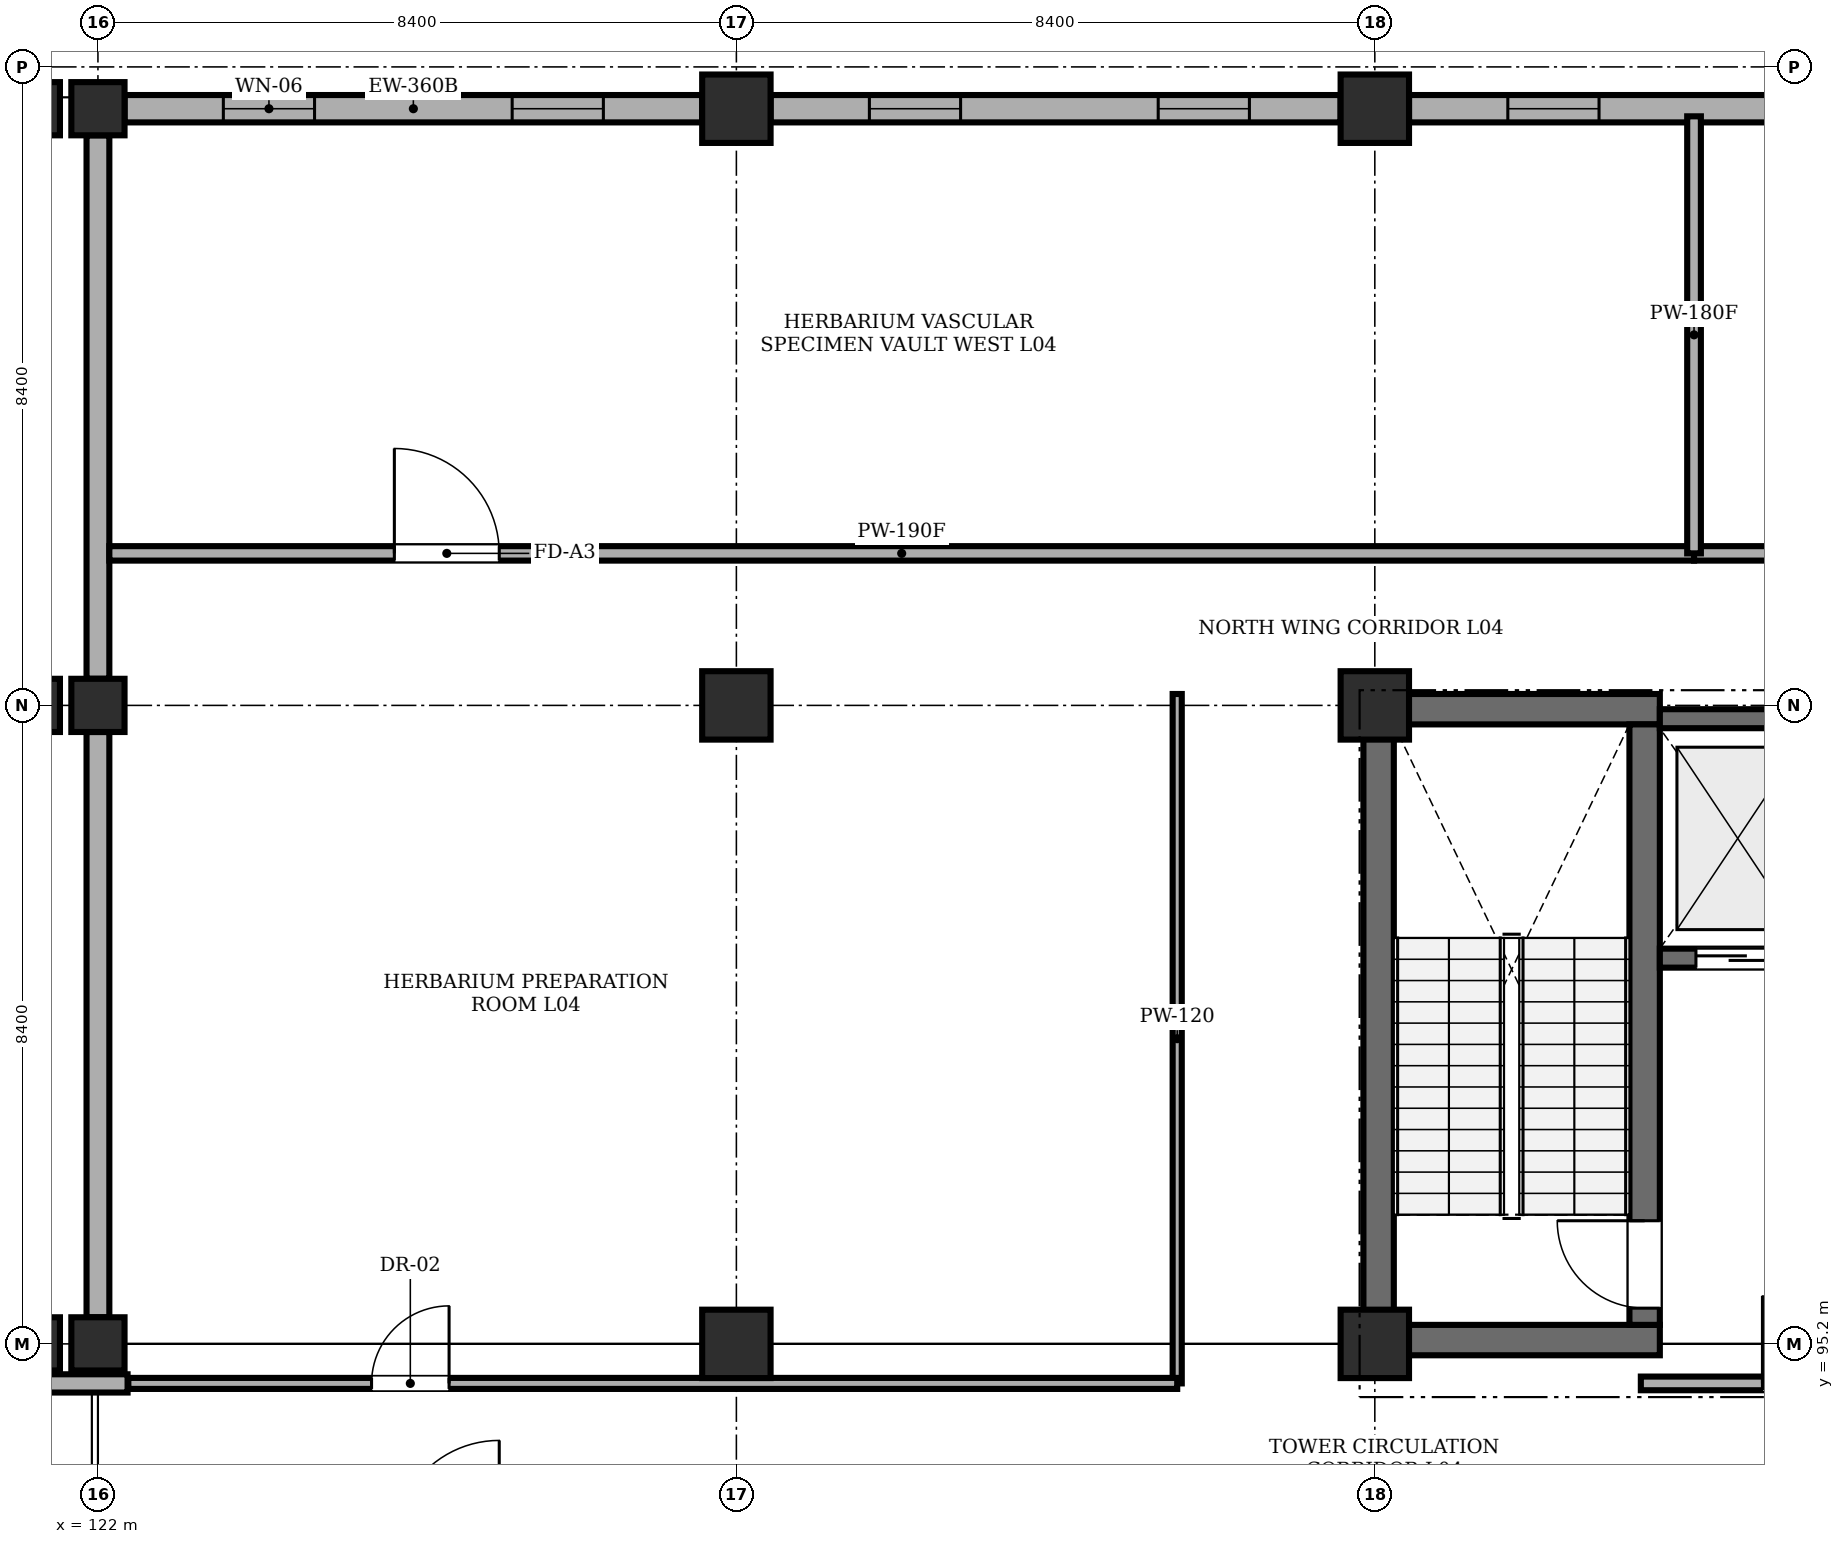
"""IFC4 building model, lengths in metres.
Left out: names, types, materials, properties, quantities, classifications, styles, units other than length and angle.
Written with IfcOpenShell. Run it as: python <this file> out.ifc"""

import sys

from ifc_helpers import new_model, si_unit, direction, frame, frame_2d, origin, origin_2d, place, context, subcontext, project, spatial, rectangle, extrude, element, fill, save


model = new_model("IFC4")
c1 = context("Model", 3, precision=1e-05, world=origin(), true_north=direction((0.0, 1.0)))
c2 = subcontext(c1, "Body", "Model", "MODEL_VIEW")
j1 = project(units=[si_unit("LENGTHUNIT", "METRE"), si_unit("PLANEANGLEUNIT", "RADIAN")], contexts=[c1])
p1 = place(None, origin())
s1 = spatial("IfcSite", under=j1, at=p1, CompositionType="ELEMENT")
p2 = place(p1, origin())
s2 = spatial("IfcBuilding", under=s1, at=p2, CompositionType="ELEMENT")
p3 = place(p2, frame((0.0, 0.0, 14.7)))
s3 = spatial("IfcBuildingStorey", under=s2, at=p3, CompositionType="ELEMENT", Elevation=14.7)
for number, where, z_axis, x_axis in (
    (1, (121.15, 95.2, 0.0), (0.0, 0.0, 1.0), (1.0, 0.0, 0.0)),
    (2, (121.15, 103.6, 0.0), (0.0, 0.0, 1.0), (1.0, 0.0, 0.0)),
    (3, (121.15, 111.45, 0.0), (0.0, 0.0, 1.0), (1.0, 0.0, 0.0)),
):
    element("IfcColumn", number, at=place(p3, frame(where, z_axis=z_axis, x_axis=x_axis)), inside=s3, PredefinedType="COLUMN", context=c2, shape_type="SweptSolid", body=[
        extrude(rectangle(XDim=0.7, YDim=0.7, at=origin_2d()), origin(), (0.0, 0.0, 1.0), 4.5),
    ])
for number, where, z_axis, x_axis in (
    (4, (122.0, 95.2, 0.0), (0.0, 0.0, 1.0), (1.0, 0.0, 0.0)),
    (5, (122.0, 103.6, 0.0), (0.0, 0.0, 1.0), (1.0, 0.0, 0.0)),
    (6, (122.0, 111.45, 0.0), (0.0, 0.0, 1.0), (1.0, 0.0, 0.0)),
):
    element("IfcColumn", number, at=place(p3, frame(where, z_axis=z_axis, x_axis=x_axis)), inside=s3, PredefinedType="COLUMN", context=c2, shape_type="SweptSolid", body=[
        extrude(rectangle(XDim=0.7, YDim=0.7, at=origin_2d()), origin(), (0.0, 0.0, 1.0), 4.26),
    ])
for number, where, z_axis, x_axis in (
    (7, (130.4, 95.2, 0.0), (0.0, 0.0, 1.0), (1.0, 0.0, 0.0)),
    (8, (130.4, 103.6, 0.0), (0.0, 0.0, 1.0), (1.0, 0.0, 0.0)),
    (9, (130.4, 111.45, 0.0), (0.0, 0.0, 1.0), (1.0, 0.0, 0.0)),
    (10, (138.8, 95.2, 0.0), (0.0, 0.0, 1.0), (1.0, 0.0, 0.0)),
    (11, (138.8, 103.6, 0.0), (0.0, 0.0, 1.0), (1.0, 0.0, 0.0)),
    (12, (138.8, 111.45, 0.0), (0.0, 0.0, 1.0), (1.0, 0.0, 0.0)),
):
    element("IfcColumn", number, at=place(p3, frame(where, z_axis=z_axis, x_axis=x_axis)), inside=s3, PredefinedType="COLUMN", context=c2, shape_type="SweptSolid", body=[
        extrude(rectangle(XDim=0.9, YDim=0.9, at=origin_2d()), origin(), (0.0, 0.0, 1.0), 4.26),
    ])
for number, where, z_axis, x_axis in (
    (13, (138.65, 95.25, 0.0), (0.0, 0.0, 1.0), (1.0, 0.0, 0.0)),
    (14, (138.65, 103.55, 0.0), (0.0, 0.0, 1.0), (1.0, 0.0, 0.0)),
):
    element("IfcWall", number, at=place(p3, frame(where, z_axis=z_axis, x_axis=x_axis)), inside=s3, PredefinedType="SHEAR", context=c2, shape_type="SweptSolid", body=[
        extrude(rectangle(XDim=3.9, YDim=0.4, at=frame_2d((1.95, 0.0))), origin(), (0.0, 0.0, 1.0), 4.26),
    ])
p4 = place(p3, frame((138.85, 95.45, 0.0), z_axis=(0.0, 0.0, 1.0), x_axis=(0.0, 1.0, 0.0)))
e15 = element("IfcWall", 15, at=p4, inside=s3, PredefinedType="SHEAR", context=c2, shape_type="SweptSolid", body=[
    extrude(rectangle(XDim=7.9, YDim=0.4, at=frame_2d((3.95, 0.0))), origin(), (0.0, 0.0, 1.0), 4.26),
])
p5 = place(p3, frame((142.35, 95.45, 0.0), z_axis=(0.0, 0.0, 1.0), x_axis=(0.0, 1.0, 0.0)))
e16 = element("IfcWall", 16, at=p5, inside=s3, PredefinedType="SHEAR", context=c2, shape_type="SweptSolid", body=[
    extrude(rectangle(XDim=7.9, YDim=0.4, at=frame_2d((3.95, 0.0))), origin(), (0.0, 0.0, 1.0), 4.26),
])
p6 = place(p5, frame((0.22, 0.0, 0.0)))
e17 = element("IfcOpeningElement", 17, at=p6, cuts=e16, PredefinedType="OPENING", context=c2, shape_type="SweptSolid", body=[
    extrude(rectangle(XDim=1.15, YDim=2.15, at=frame_2d((0.575, 1.075))), frame((0.0, 0.21, 0.0), z_axis=(0.0, -1.0, 0.0), x_axis=(1.0, 0.0, 0.0)), (0.0, 0.0, 1.0), 0.42),
])
p7 = place(p3, frame((142.55, 100.275, 0.0), z_axis=(0.0, 0.0, 1.0), x_axis=(1.0, 0.0, 0.0)))
e18 = element("IfcWall", 18, at=p7, inside=s3, PredefinedType="SHEAR", context=c2, shape_type="SweptSolid", body=[
    extrude(rectangle(XDim=2.05, YDim=0.25, at=frame_2d((1.025, 0.0))), origin(), (0.0, 0.0, 1.0), 4.26),
])
p8 = place(p7, frame((0.475, 0.0, 0.0)))
e19 = element("IfcOpeningElement", 19, at=p8, cuts=e18, PredefinedType="OPENING", context=c2, shape_type="SweptSolid", body=[
    extrude(rectangle(XDim=1.1, YDim=2.15, at=frame_2d((0.55, 1.075))), frame((0.0, 0.135, 0.0), z_axis=(0.0, -1.0, 0.0), x_axis=(1.0, 0.0, 0.0)), (0.0, 0.0, 1.0), 0.27),
])
p9 = place(p3, frame((142.55, 103.425, 0.0), z_axis=(0.0, 0.0, 1.0), x_axis=(1.0, 0.0, 0.0)))
e20 = element("IfcWall", 20, at=p9, inside=s3, PredefinedType="SHEAR", context=c2, shape_type="SweptSolid", body=[
    extrude(rectangle(XDim=2.05, YDim=0.25, at=frame_2d((1.025, 0.0))), origin(), (0.0, 0.0, 1.0), 4.26),
])
p10 = place(p3, frame((122.35, 111.45, 0.0), z_axis=(0.0, 0.0, 1.0), x_axis=(1.0, 0.0, 0.0)))
e21 = element("IfcWall", 21, at=p10, inside=s3, PredefinedType="STANDARD", context=c2, shape_type="SweptSolid", body=[
    extrude(rectangle(XDim=7.6, YDim=0.36, at=frame_2d((3.8, 0.0))), origin(), (0.0, 0.0, 1.0), 3.56),
])
p11 = place(p10, frame((1.3, 0.0, 1.1)))
e22 = element("IfcOpeningElement", 22, at=p11, cuts=e21, PredefinedType="OPENING", context=c2, shape_type="SweptSolid", body=[
    extrude(rectangle(XDim=1.2, YDim=1.8, at=frame_2d((0.6, 0.9))), frame((0.0, 0.19, 0.0), z_axis=(0.0, -1.0, 0.0), x_axis=(1.0, 0.0, 0.0)), (0.0, 0.0, 1.0), 0.38),
])
p12 = place(p10, frame((5.1, 0.0, 1.1)))
e23 = element("IfcOpeningElement", 23, at=p12, cuts=e21, PredefinedType="OPENING", context=c2, shape_type="SweptSolid", body=[
    extrude(rectangle(XDim=1.2, YDim=1.8, at=frame_2d((0.6, 0.9))), frame((0.0, 0.19, 0.0), z_axis=(0.0, -1.0, 0.0), x_axis=(1.0, 0.0, 0.0)), (0.0, 0.0, 1.0), 0.38),
])
p13 = place(p3, frame((130.85, 111.45, 0.0), z_axis=(0.0, 0.0, 1.0), x_axis=(1.0, 0.0, 0.0)))
e24 = element("IfcWall", 24, at=p13, inside=s3, PredefinedType="STANDARD", context=c2, shape_type="SweptSolid", body=[
    extrude(rectangle(XDim=7.5, YDim=0.36, at=frame_2d((3.75, 0.0))), origin(), (0.0, 0.0, 1.0), 3.56),
])
p14 = place(p13, frame((1.3, 0.0, 1.1)))
e25 = element("IfcOpeningElement", 25, at=p14, cuts=e24, PredefinedType="OPENING", context=c2, shape_type="SweptSolid", body=[
    extrude(rectangle(XDim=1.2, YDim=1.8, at=frame_2d((0.6, 0.9))), frame((0.0, 0.19, 0.0), z_axis=(0.0, -1.0, 0.0), x_axis=(1.0, 0.0, 0.0)), (0.0, 0.0, 1.0), 0.38),
])
p15 = place(p13, frame((5.1, 0.0, 1.1)))
e26 = element("IfcOpeningElement", 26, at=p15, cuts=e24, PredefinedType="OPENING", context=c2, shape_type="SweptSolid", body=[
    extrude(rectangle(XDim=1.2, YDim=1.8, at=frame_2d((0.6, 0.9))), frame((0.0, 0.19, 0.0), z_axis=(0.0, -1.0, 0.0), x_axis=(1.0, 0.0, 0.0)), (0.0, 0.0, 1.0), 0.38),
])
p16 = place(p3, frame((139.25, 111.45, 0.0), z_axis=(0.0, 0.0, 1.0), x_axis=(1.0, 0.0, 0.0)))
e27 = element("IfcWall", 27, at=p16, inside=s3, PredefinedType="STANDARD", context=c2, shape_type="SweptSolid", body=[
    extrude(rectangle(XDim=7.5, YDim=0.36, at=frame_2d((3.75, 0.0))), origin(), (0.0, 0.0, 1.0), 3.56),
])
p17 = place(p16, frame((1.3, 0.0, 1.1)))
e28 = element("IfcOpeningElement", 28, at=p17, cuts=e27, PredefinedType="OPENING", context=c2, shape_type="SweptSolid", body=[
    extrude(rectangle(XDim=1.2, YDim=1.8, at=frame_2d((0.6, 0.9))), frame((0.0, 0.19, 0.0), z_axis=(0.0, -1.0, 0.0), x_axis=(1.0, 0.0, 0.0)), (0.0, 0.0, 1.0), 0.38),
])
p18 = place(p16, frame((5.1, 0.0, 1.1)))
e29 = element("IfcOpeningElement", 29, at=p18, cuts=e27, PredefinedType="OPENING", context=c2, shape_type="SweptSolid", body=[
    extrude(rectangle(XDim=1.2, YDim=1.8, at=frame_2d((0.6, 0.9))), frame((0.0, 0.19, 0.0), z_axis=(0.0, -1.0, 0.0), x_axis=(1.0, 0.0, 0.0)), (0.0, 0.0, 1.0), 0.38),
])
p19 = place(p3, frame((121.03, 94.68, 0.0), z_axis=(0.0, 0.0, 1.0), x_axis=(1.0, 0.0, 0.0)))
e30 = element("IfcWall", 30, at=p19, inside=s3, PredefinedType="STANDARD", context=c2, shape_type="SweptSolid", body=[
    extrude(rectangle(XDim=1.36, YDim=0.24, at=frame_2d((0.68, 0.0))), origin(), (0.0, 0.0, 1.0), 4.26),
])
p20 = place(p3, frame((122.0, 95.55, 0.0), z_axis=(0.0, 0.0, 1.0), x_axis=(0.0, 1.0, 0.0)))
e31 = element("IfcWall", 31, at=p20, inside=s3, PredefinedType="STANDARD", context=c2, shape_type="SweptSolid", body=[
    extrude(rectangle(XDim=7.7, YDim=0.3, at=frame_2d((3.85, 0.0))), origin(), (0.0, 0.0, 1.0), 3.51),
])
p21 = place(p3, frame((122.0, 103.95, 0.0), z_axis=(0.0, 0.0, 1.0), x_axis=(0.0, 1.0, 0.0)))
e32 = element("IfcWall", 32, at=p21, inside=s3, PredefinedType="STANDARD", context=c2, shape_type="SweptSolid", body=[
    extrude(rectangle(XDim=7.15, YDim=0.3, at=frame_2d((3.575, 0.0))), origin(), (0.0, 0.0, 1.0), 3.51),
])
p22 = place(p3, frame((142.3, 94.68, 0.0), z_axis=(0.0, 0.0, 1.0), x_axis=(1.0, 0.0, 0.0)))
e33 = element("IfcWall", 33, at=p22, inside=s3, PredefinedType="STANDARD", context=c2, shape_type="SweptSolid", body=[
    extrude(rectangle(XDim=4.8, YDim=0.18, at=frame_2d((2.4, 0.0))), origin(), (0.0, 0.0, 1.0), 4.26),
])
p23 = place(p22, frame((1.6, 0.0, 0.0)))
e34 = element("IfcOpeningElement", 34, at=p23, cuts=e33, PredefinedType="OPENING", context=c2, shape_type="SweptSolid", body=[
    extrude(rectangle(XDim=1.15, YDim=2.15, at=frame_2d((0.575, 1.075))), frame((0.0, 0.1, 0.0), z_axis=(0.0, -1.0, 0.0), x_axis=(1.0, 0.0, 0.0)), (0.0, 0.0, 1.0), 0.2),
])
p24 = place(p3, frame((136.2, 94.68, 0.0), z_axis=(0.0, 0.0, 1.0), x_axis=(0.0, 1.0, 0.0)))
e35 = element("IfcWall", 35, at=p24, inside=s3, PredefinedType="PARTITIONING", context=c2, shape_type="SweptSolid", body=[
    extrude(rectangle(XDim=9.07, YDim=0.12, at=frame_2d((4.535, 0.0))), origin(), (0.0, 0.0, 1.0), 4.26),
])
p25 = place(p3, frame((122.4, 94.68, 0.0), z_axis=(0.0, 0.0, 1.0), x_axis=(1.0, 0.0, 0.0)))
e36 = element("IfcWall", 36, at=p25, inside=s3, PredefinedType="PARTITIONING", context=c2, shape_type="SweptSolid", body=[
    extrude(rectangle(XDim=13.8, YDim=0.145, at=frame_2d((6.9, 0.0))), origin(), (0.0, 0.0, 1.0), 4.26),
])
p26 = place(p25, frame((3.2, 0.0, 0.0)))
e37 = element("IfcOpeningElement", 37, at=p26, cuts=e36, PredefinedType="OPENING", context=c2, shape_type="SweptSolid", body=[
    extrude(rectangle(XDim=1.02, YDim=2.15, at=frame_2d((0.51, 1.075))), frame((0.0, 0.083, 0.0), z_axis=(0.0, -1.0, 0.0), x_axis=(1.0, 0.0, 0.0)), (0.0, 0.0, 1.0), 0.165),
])
p27 = place(p3, frame((122.15, 105.6, 0.0), z_axis=(0.0, 0.0, 1.0), x_axis=(1.0, 0.0, 0.0)))
e38 = element("IfcWall", 38, at=p27, inside=s3, PredefinedType="SOLIDWALL", context=c2, shape_type="SweptSolid", body=[
    extrude(rectangle(XDim=20.85, YDim=0.19, at=frame_2d((10.425, 0.0))), origin(), (0.0, 0.0, 1.0), 4.26),
])
p28 = place(p27, frame((3.75, 0.0, 0.0)))
e39 = element("IfcOpeningElement", 39, at=p28, cuts=e38, PredefinedType="OPENING", context=c2, shape_type="SweptSolid", body=[
    extrude(rectangle(XDim=1.38, YDim=2.22, at=frame_2d((0.69, 1.11))), frame((0.0, 0.105, 0.0), z_axis=(0.0, -1.0, 0.0), x_axis=(1.0, 0.0, 0.0)), (0.0, 0.0, 1.0), 0.21),
])
p29 = place(p3, frame((143.0, 105.6, 0.0), z_axis=(0.0, 0.0, 1.0), x_axis=(1.0, 0.0, 0.0)))
e40 = element("IfcWall", 40, at=p29, inside=s3, PredefinedType="SOLIDWALL", context=c2, shape_type="SweptSolid", body=[
    extrude(rectangle(XDim=20.35, YDim=0.19, at=frame_2d((10.175, 0.0))), origin(), (0.0, 0.0, 1.0), 4.26),
])
p30 = place(p29, frame((6.8, 0.0, 0.0)))
e41 = element("IfcOpeningElement", 41, at=p30, cuts=e40, PredefinedType="OPENING", context=c2, shape_type="SweptSolid", body=[
    extrude(rectangle(XDim=1.38, YDim=2.22, at=frame_2d((0.69, 1.11))), frame((0.0, 0.105, 0.0), z_axis=(0.0, -1.0, 0.0), x_axis=(1.0, 0.0, 0.0)), (0.0, 0.0, 1.0), 0.21),
])
p31 = place(p3, frame((143.0, 105.6, 0.0), z_axis=(0.0, 0.0, 1.0), x_axis=(0.0, 1.0, 0.0)))
e42 = element("IfcWall", 42, at=p31, inside=s3, PredefinedType="STANDARD", context=c2, shape_type="SweptSolid", body=[
    extrude(rectangle(XDim=5.75, YDim=0.18, at=frame_2d((2.875, 0.0))), origin(), (0.0, 0.0, 1.0), 3.76),
])
p32 = place(p11, origin())
e43 = element("IfcWindow", 43, at=p32, inside=s3, PartitioningType="SINGLE_PANEL", PredefinedType="WINDOW", context=c2, shape_type="SweptSolid", body=[
    extrude(rectangle(XDim=1.2, YDim=1.8, at=frame_2d((0.6, 0.9))), frame((0.0, 0.03, 0.0), z_axis=(0.0, -1.0, 0.0), x_axis=(1.0, 0.0, 0.0)), (0.0, 0.0, 1.0), 0.06),
])
fill(e22, e43)
p33 = place(p12, origin())
e44 = element("IfcWindow", 44, at=p33, inside=s3, PartitioningType="SINGLE_PANEL", PredefinedType="WINDOW", context=c2, shape_type="SweptSolid", body=[
    extrude(rectangle(XDim=1.2, YDim=1.8, at=frame_2d((0.6, 0.9))), frame((0.0, 0.03, 0.0), z_axis=(0.0, -1.0, 0.0), x_axis=(1.0, 0.0, 0.0)), (0.0, 0.0, 1.0), 0.06),
])
fill(e23, e44)
p34 = place(p14, origin())
e45 = element("IfcWindow", 45, at=p34, inside=s3, PartitioningType="SINGLE_PANEL", PredefinedType="WINDOW", context=c2, shape_type="SweptSolid", body=[
    extrude(rectangle(XDim=1.2, YDim=1.8, at=frame_2d((0.6, 0.9))), frame((0.0, 0.03, 0.0), z_axis=(0.0, -1.0, 0.0), x_axis=(1.0, 0.0, 0.0)), (0.0, 0.0, 1.0), 0.06),
])
fill(e25, e45)
p35 = place(p15, origin())
e46 = element("IfcWindow", 46, at=p35, inside=s3, PartitioningType="SINGLE_PANEL", PredefinedType="WINDOW", context=c2, shape_type="SweptSolid", body=[
    extrude(rectangle(XDim=1.2, YDim=1.8, at=frame_2d((0.6, 0.9))), frame((0.0, 0.03, 0.0), z_axis=(0.0, -1.0, 0.0), x_axis=(1.0, 0.0, 0.0)), (0.0, 0.0, 1.0), 0.06),
])
fill(e26, e46)
p36 = place(p17, origin())
e47 = element("IfcWindow", 47, at=p36, inside=s3, PartitioningType="SINGLE_PANEL", PredefinedType="WINDOW", context=c2, shape_type="SweptSolid", body=[
    extrude(rectangle(XDim=1.2, YDim=1.8, at=frame_2d((0.6, 0.9))), frame((0.0, 0.03, 0.0), z_axis=(0.0, -1.0, 0.0), x_axis=(1.0, 0.0, 0.0)), (0.0, 0.0, 1.0), 0.06),
])
fill(e28, e47)
p37 = place(p23, origin())
e48 = element("IfcDoor", 48, at=p37, inside=s3, OperationType="SINGLE_SWING_LEFT", PredefinedType="DOOR", context=c2, shape_type="SweptSolid", body=[
    extrude(rectangle(XDim=1.15, YDim=2.15, at=frame_2d((0.575, 1.075))), frame((0.0, 0.025, 0.0), z_axis=(0.0, -1.0, 0.0), x_axis=(1.0, 0.0, 0.0)), (0.0, 0.0, 1.0), 0.05),
])
fill(e34, e48)
p38 = place(p26, origin())
e49 = element("IfcDoor", 49, at=p38, inside=s3, OperationType="SINGLE_SWING_RIGHT", PredefinedType="DOOR", context=c2, shape_type="SweptSolid", body=[
    extrude(rectangle(XDim=1.02, YDim=2.15, at=frame_2d((0.51, 1.075))), frame((0.0, 0.025, 0.0), z_axis=(0.0, -1.0, 0.0), x_axis=(1.0, 0.0, 0.0)), (0.0, 0.0, 1.0), 0.05),
])
fill(e37, e49)
p39 = place(p28, origin())
e50 = element("IfcDoor", 50, at=p39, inside=s3, OperationType="SINGLE_SWING_LEFT", PredefinedType="DOOR", context=c2, shape_type="SweptSolid", body=[
    extrude(rectangle(XDim=1.38, YDim=2.22, at=frame_2d((0.69, 1.11))), frame((0.0, 0.025, 0.0), z_axis=(0.0, -1.0, 0.0), x_axis=(1.0, 0.0, 0.0)), (0.0, 0.0, 1.0), 0.05),
])
fill(e39, e50)
p40 = place(p6, origin())
e51 = element("IfcDoor", 51, at=p40, inside=s3, OperationType="SINGLE_SWING_RIGHT", PredefinedType="DOOR", context=c2, shape_type="SweptSolid", body=[
    extrude(rectangle(XDim=1.15, YDim=2.15, at=frame_2d((0.575, 1.075))), frame((0.0, 0.025, 0.0), z_axis=(0.0, -1.0, 0.0), x_axis=(1.0, 0.0, 0.0)), (0.0, 0.0, 1.0), 0.05),
])
fill(e17, e51)
p41 = place(p8, origin())
e52 = element("IfcDoor", 52, at=p41, inside=s3, OperationType="SLIDING_TO_LEFT", PredefinedType="DOOR", context=c2, shape_type="SweptSolid", body=[
    extrude(rectangle(XDim=1.1, YDim=2.15, at=frame_2d((0.55, 1.075))), frame((0.0, 0.025, 0.0), z_axis=(0.0, -1.0, 0.0), x_axis=(1.0, 0.0, 0.0)), (0.0, 0.0, 1.0), 0.05),
])
fill(e19, e52)
save(model, sys.argv[1])
